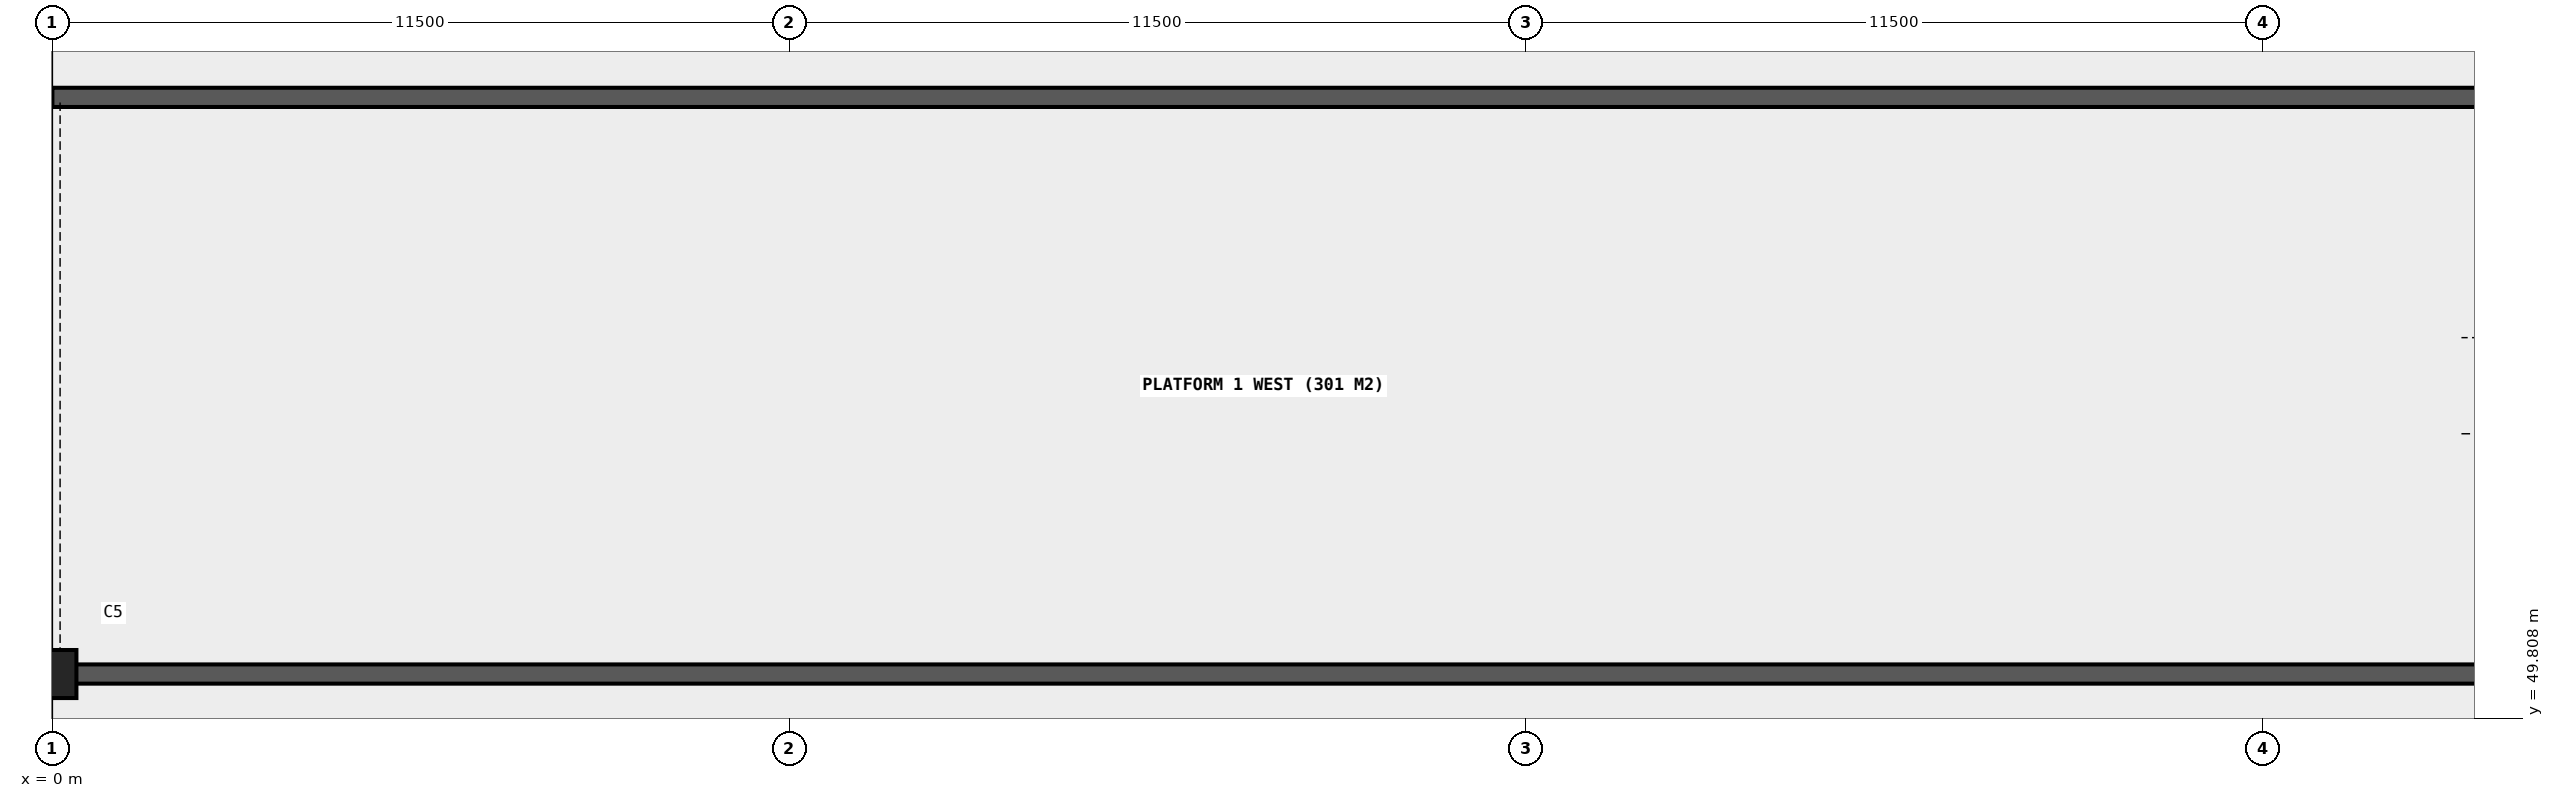
"""IFC4 building model, lengths in metres.
Left out: names, types, materials, properties, quantities, classifications, styles, units other than length and angle.
Written with IfcOpenShell. Run it as: python <this file> out.ifc"""

import sys

from ifc_helpers import new_model, si_unit, direction, frame, frame_2d, origin, origin_2d, place, context, subcontext, project, spatial, rectangle, extrude, element, save


model = new_model("IFC4")
c1 = context("Model", 3, precision=1e-05, world=origin(), true_north=direction((0.0, 1.0)))
c2 = subcontext(c1, "Body", "Model", "MODEL_VIEW")
j1 = project(units=[si_unit("LENGTHUNIT", "METRE"), si_unit("PLANEANGLEUNIT", "RADIAN")], contexts=[c1])
p1 = place(None, origin())
s1 = spatial("IfcSite", under=j1, at=p1, CompositionType="ELEMENT")
p2 = place(p1, origin())
s2 = spatial("IfcBuilding", under=s1, at=p2, CompositionType="ELEMENT")
p3 = place(p2, origin())
s3 = spatial("IfcBuildingStorey", under=s2, at=p3, CompositionType="ELEMENT", Elevation=0.0)
for number, where, z_axis, x_axis in (
    (1, (0.0, 50.5, -0.32), (0.0, 0.0, 1.0), (1.0, 0.0, 0.0)),
    (2, (0.0, 59.5, -0.32), (0.0, 0.0, 1.0), (1.0, 0.0, 0.0)),
):
    element("IfcWall", number, at=place(p3, frame(where, z_axis=z_axis, x_axis=x_axis)), inside=s3, PredefinedType="SHEAR", context=c2, shape_type="SweptSolid", body=[
        extrude(rectangle(XDim=184.0, YDim=0.3, at=frame_2d((92.0, 0.0))), origin(), (0.0, 0.0, 1.0), 1.27),
    ])
p4 = place(p3, frame((0.0, 50.5, 0.55), z_axis=(0.0, 0.0, 1.0), x_axis=(1.0, 0.0, 0.0)))
e3 = element("IfcColumn", 3, at=p4, inside=s3, PredefinedType="COLUMN", context=c2, shape_type="SweptSolid", body=[
    extrude(rectangle(XDim=0.75, YDim=0.75, at=origin_2d()), origin(), (0.0, 0.0, 1.0), 3.65),
])
save(model, sys.argv[1])
